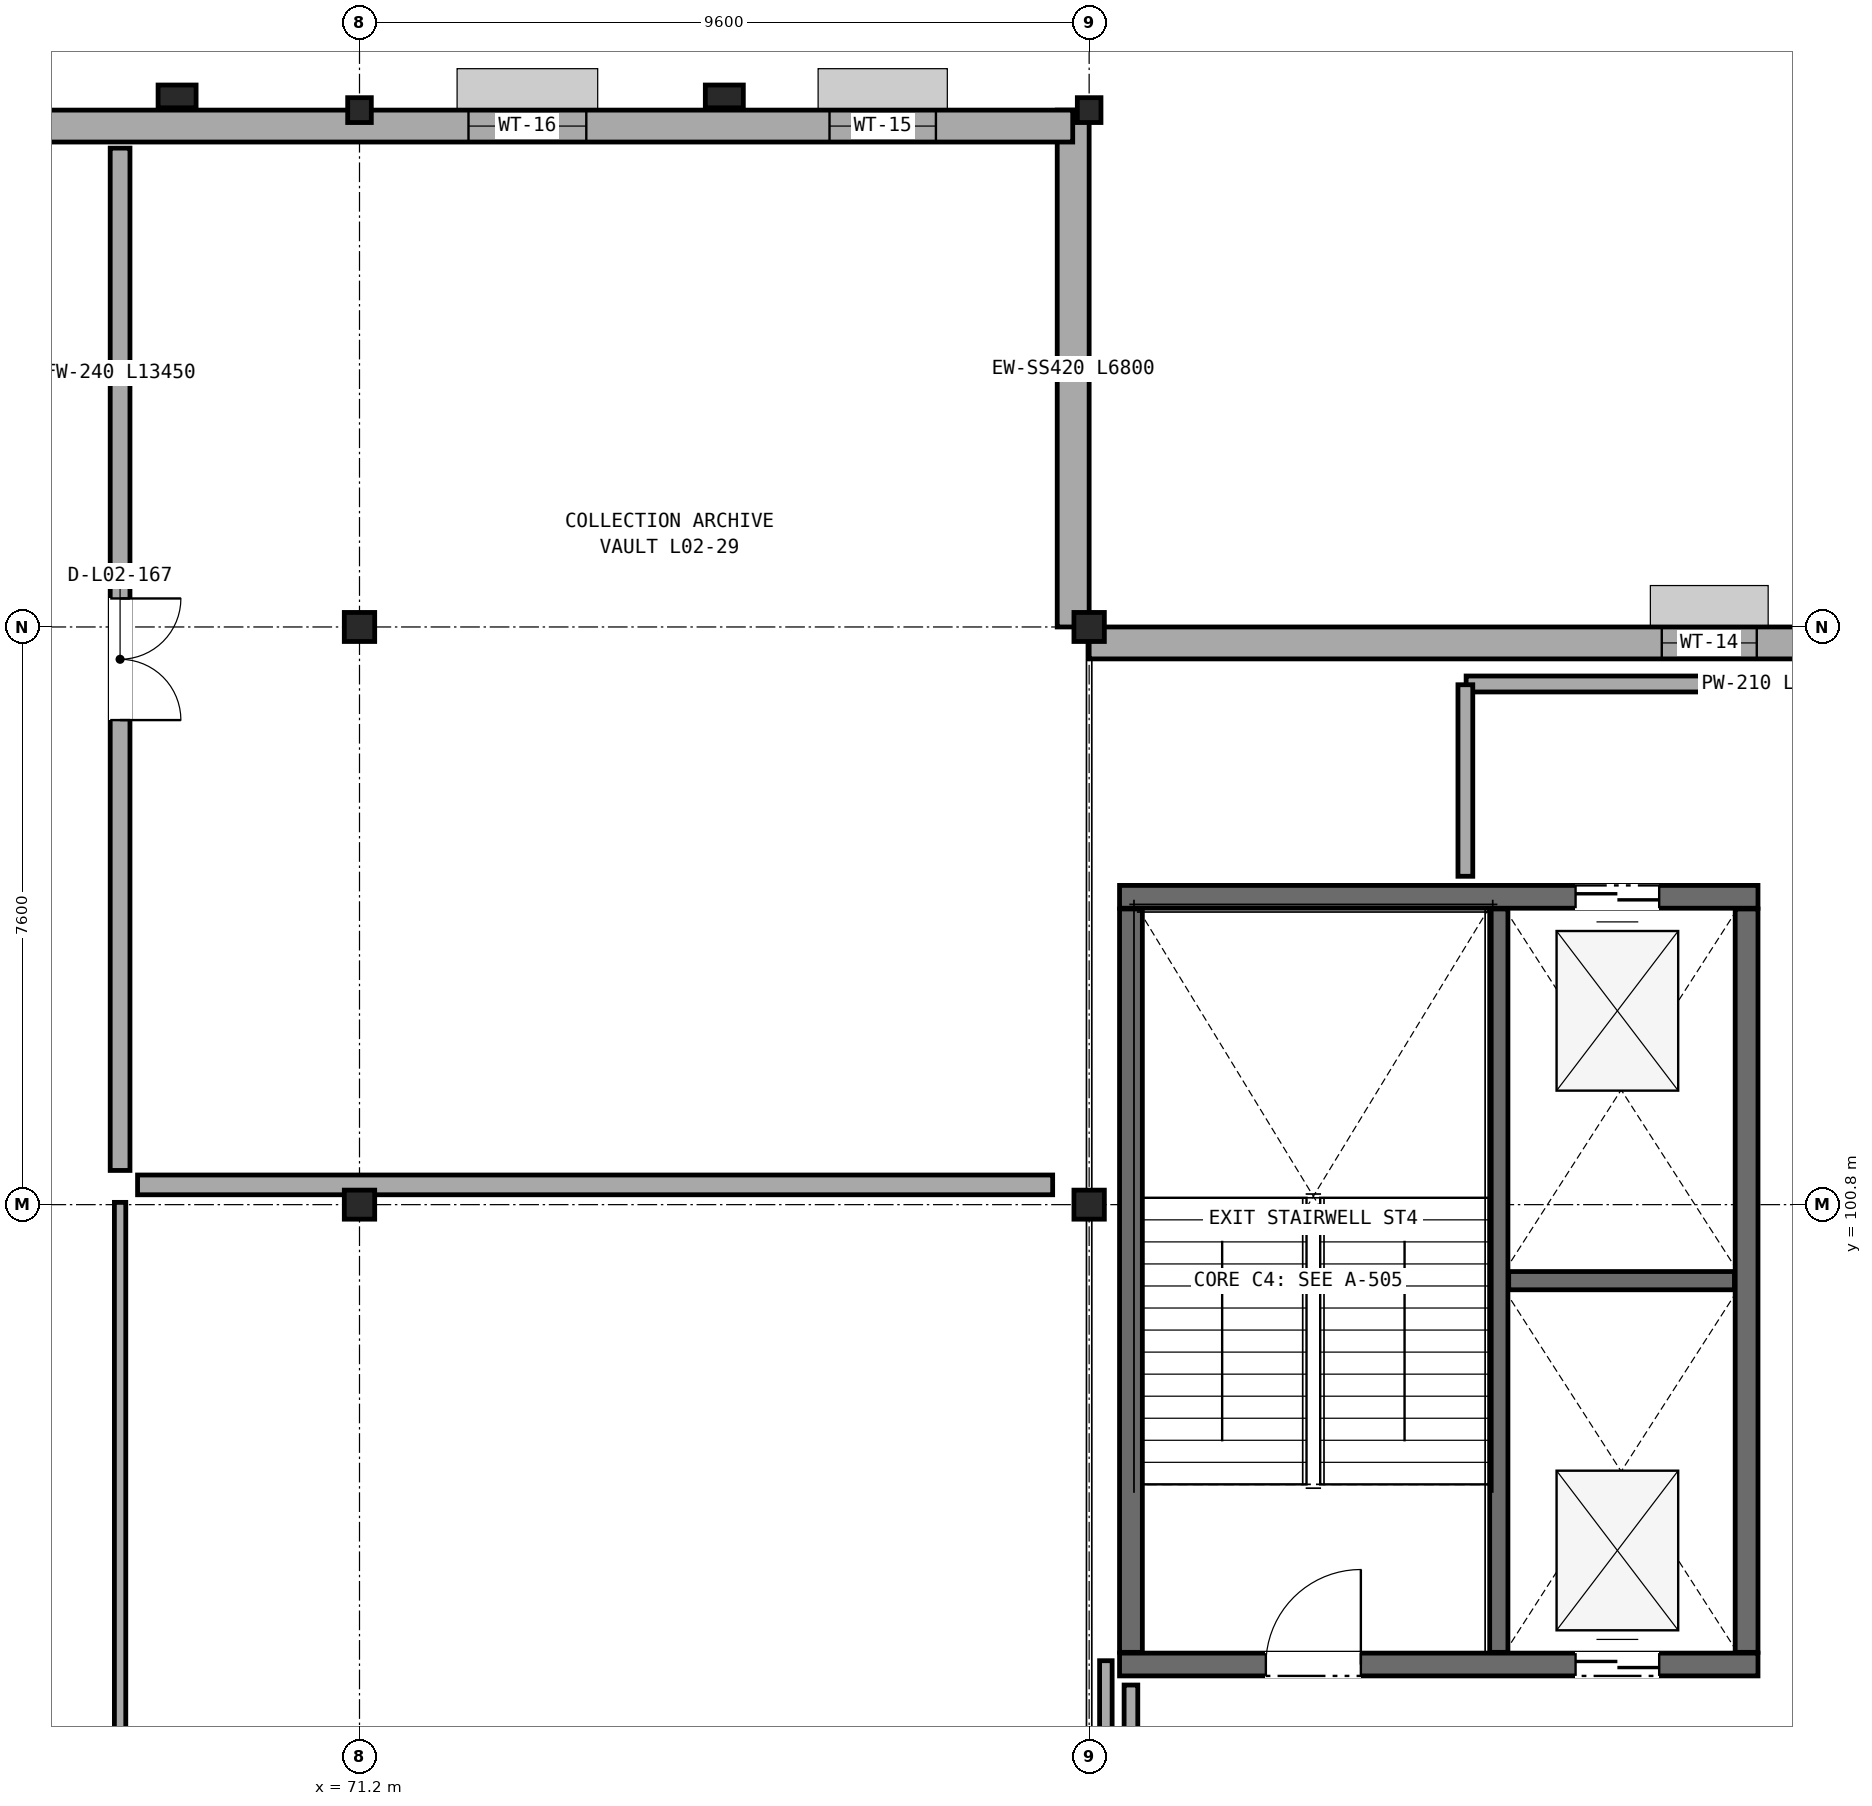
"""IFC4 building model, lengths in metres.
Left out: names, types, materials, properties, quantities, classifications, styles, units other than length and angle.
Written with IfcOpenShell. Run it as: python <this file> out.ifc"""

import sys

from ifc_helpers import new_model, si_unit, direction, frame, frame_2d, origin, origin_2d, place, context, subcontext, project, spatial, rectangle, i_section, extrude, element, fill, save


model = new_model("IFC4")
c1 = context("Model", 3, precision=1e-05, world=origin(), true_north=direction((0.0, 1.0)))
c2 = subcontext(c1, "Body", "Model", "MODEL_VIEW")
j1 = project(units=[si_unit("LENGTHUNIT", "METRE"), si_unit("PLANEANGLEUNIT", "RADIAN")], contexts=[c1])
p1 = place(None, origin())
s1 = spatial("IfcSite", under=j1, at=p1, CompositionType="ELEMENT")
p2 = place(p1, origin())
s2 = spatial("IfcBuilding", under=s1, at=p2, CompositionType="ELEMENT")
p3 = place(p2, frame((0.0, 0.0, 10.1)))
s3 = spatial("IfcBuildingStorey", under=s2, at=p3, CompositionType="ELEMENT", Elevation=10.1)
for number, where, z_axis, x_axis in (
    (1, (71.2, 100.8, 0.0), (0.0, 0.0, 1.0), (1.0, 0.0, 0.0)),
    (2, (71.2, 108.4, 0.0), (0.0, 0.0, 1.0), (1.0, 0.0, 0.0)),
):
    element("IfcColumn", number, at=place(p3, frame(where, z_axis=z_axis, x_axis=x_axis)), inside=s3, PredefinedType="COLUMN", context=c2, shape_type="SweptSolid", body=[
        extrude(i_section(OverallWidth=0.4, OverallDepth=0.382, WebThickness=0.025, FlangeThickness=0.036, at=origin_2d()), origin(), (0.0, 0.0, 1.0), 4.5),
    ])
p4 = place(p3, frame((71.2, 115.2, 0.0), z_axis=(0.0, 0.0, 1.0), x_axis=(1.0, 0.0, 0.0)))
e3 = element("IfcColumn", 3, at=p4, inside=s3, PredefinedType="COLUMN", context=c2, shape_type="SweptSolid", body=[
    extrude(i_section(OverallWidth=0.311, OverallDepth=0.327, WebThickness=0.016, FlangeThickness=0.025, FilletRadius=0.017, at=origin_2d()), origin(), (0.0, 0.0, 1.0), 4.5),
])
for number, where, z_axis, x_axis in (
    (4, (80.8, 100.8, 0.0), (0.0, 0.0, 1.0), (1.0, 0.0, 0.0)),
    (5, (80.8, 108.4, 0.0), (0.0, 0.0, 1.0), (1.0, 0.0, 0.0)),
):
    element("IfcColumn", number, at=place(p3, frame(where, z_axis=z_axis, x_axis=x_axis)), inside=s3, PredefinedType="COLUMN", context=c2, shape_type="SweptSolid", body=[
        extrude(i_section(OverallWidth=0.4, OverallDepth=0.382, WebThickness=0.025, FlangeThickness=0.036, at=origin_2d()), origin(), (0.0, 0.0, 1.0), 4.5),
    ])
p5 = place(p3, frame((80.8, 115.2, 0.0), z_axis=(0.0, 0.0, 1.0), x_axis=(1.0, 0.0, 0.0)))
e6 = element("IfcColumn", 6, at=p5, inside=s3, PredefinedType="COLUMN", context=c2, shape_type="SweptSolid", body=[
    extrude(i_section(OverallWidth=0.311, OverallDepth=0.327, WebThickness=0.016, FlangeThickness=0.025, FilletRadius=0.017, at=origin_2d()), origin(), (0.0, 0.0, 1.0), 4.5),
])
for number, where, z_axis, x_axis in (
    (7, (68.8, 115.38, 0.0), (0.0, 0.0, 1.0), (1.0, 0.0, 0.0)),
    (8, (76.0, 115.38, 0.0), (0.0, 0.0, 1.0), (1.0, 0.0, 0.0)),
):
    element("IfcColumn", number, at=place(p3, frame(where, z_axis=z_axis, x_axis=x_axis)), inside=s3, PredefinedType="PILASTER", context=c2, shape_type="SweptSolid", body=[
        extrude(rectangle(XDim=0.5, YDim=0.3, at=origin_2d()), origin(), (0.0, 0.0, 1.0), 4.5),
    ])
p6 = place(p3, frame((118.984, 108.19, 0.0), z_axis=(0.0, 0.0, 1.0), x_axis=(-1.0, 0.0, 0.0)))
e9 = element("IfcWall", 9, at=p6, inside=s3, PredefinedType="SOLIDWALL", context=c2, shape_type="SweptSolid", body=[
    extrude(rectangle(XDim=38.184, YDim=0.42, at=frame_2d((19.092, 0.0))), origin(), (0.0, 0.0, 1.0), 3.588),
])
p7 = place(p6, frame((1.8, 0.0, 0.9)))
e10 = element("IfcOpeningElement", 10, at=p7, cuts=e9, PredefinedType="OPENING", context=c2, shape_type="SweptSolid", body=[
    extrude(rectangle(XDim=2.2, YDim=1.55, at=frame_2d((1.1, 0.775))), frame((0.0, 0.22, 0.0), z_axis=(0.0, -1.0, 0.0), x_axis=(1.0, 0.0, 0.0)), (0.0, 0.0, 1.0), 0.44),
])
p8 = place(p6, frame((11.0, 0.0, 0.9)))
e11 = element("IfcOpeningElement", 11, at=p8, cuts=e9, PredefinedType="OPENING", context=c2, shape_type="SweptSolid", body=[
    extrude(rectangle(XDim=2.4, YDim=1.55, at=frame_2d((1.2, 0.775))), frame((0.0, 0.22, 0.0), z_axis=(0.0, -1.0, 0.0), x_axis=(1.0, 0.0, 0.0)), (0.0, 0.0, 1.0), 0.44),
])
p9 = place(p6, frame((15.6, 0.0, 0.9)))
e12 = element("IfcOpeningElement", 12, at=p9, cuts=e9, PredefinedType="OPENING", context=c2, shape_type="SweptSolid", body=[
    extrude(rectangle(XDim=2.65, YDim=1.55, at=frame_2d((1.325, 0.775))), frame((0.0, 0.22, 0.0), z_axis=(0.0, -1.0, 0.0), x_axis=(1.0, 0.0, 0.0)), (0.0, 0.0, 1.0), 0.44),
])
p10 = place(p6, frame((20.2, 0.0, 0.9)))
e13 = element("IfcOpeningElement", 13, at=p10, cuts=e9, PredefinedType="OPENING", context=c2, shape_type="SweptSolid", body=[
    extrude(rectangle(XDim=0.95, YDim=1.85, at=frame_2d((0.475, 0.925))), frame((0.0, 0.22, 0.0), z_axis=(0.0, -1.0, 0.0), x_axis=(1.0, 0.0, 0.0)), (0.0, 0.0, 1.0), 0.44),
])
p11 = place(p6, frame((24.8, 0.0, 0.9)))
e14 = element("IfcOpeningElement", 14, at=p11, cuts=e9, PredefinedType="OPENING", context=c2, shape_type="SweptSolid", body=[
    extrude(rectangle(XDim=1.1, YDim=1.85, at=frame_2d((0.55, 0.925))), frame((0.0, 0.22, 0.0), z_axis=(0.0, -1.0, 0.0), x_axis=(1.0, 0.0, 0.0)), (0.0, 0.0, 1.0), 0.44),
])
p12 = place(p6, frame((29.4, 0.0, 0.9)))
e15 = element("IfcOpeningElement", 15, at=p12, cuts=e9, PredefinedType="OPENING", context=c2, shape_type="SweptSolid", body=[
    extrude(rectangle(XDim=1.25, YDim=1.85, at=frame_2d((0.625, 0.925))), frame((0.0, 0.22, 0.0), z_axis=(0.0, -1.0, 0.0), x_axis=(1.0, 0.0, 0.0)), (0.0, 0.0, 1.0), 0.44),
])
p13 = place(p3, frame((80.59, 108.4, 0.0), z_axis=(0.0, 0.0, 1.0), x_axis=(0.0, 1.0, 0.0)))
e16 = element("IfcWall", 16, at=p13, inside=s3, PredefinedType="SOLIDWALL", context=c2, shape_type="SweptSolid", body=[
    extrude(rectangle(XDim=6.8, YDim=0.42, at=frame_2d((3.4, 0.0))), origin(), (0.0, 0.0, 1.0), 3.588),
])
p14 = place(p3, frame((80.584, 114.99, 0.0), z_axis=(0.0, 0.0, 1.0), x_axis=(-1.0, 0.0, 0.0)))
e17 = element("IfcWall", 17, at=p14, inside=s3, PredefinedType="SOLIDWALL", context=c2, shape_type="SweptSolid", body=[
    extrude(rectangle(XDim=38.184, YDim=0.42, at=frame_2d((19.092, 0.0))), origin(), (0.0, 0.0, 1.0), 3.738),
])
p15 = place(p14, frame((1.8, 0.0, 0.9)))
e18 = element("IfcOpeningElement", 18, at=p15, cuts=e17, PredefinedType="OPENING", context=c2, shape_type="SweptSolid", body=[
    extrude(rectangle(XDim=1.4, YDim=1.85, at=frame_2d((0.7, 0.925))), frame((0.0, 0.22, 0.0), z_axis=(0.0, -1.0, 0.0), x_axis=(1.0, 0.0, 0.0)), (0.0, 0.0, 1.0), 0.44),
])
p16 = place(p14, frame((6.4, 0.0, 0.9)))
e19 = element("IfcOpeningElement", 19, at=p16, cuts=e17, PredefinedType="OPENING", context=c2, shape_type="SweptSolid", body=[
    extrude(rectangle(XDim=1.55, YDim=1.85, at=frame_2d((0.775, 0.925))), frame((0.0, 0.22, 0.0), z_axis=(0.0, -1.0, 0.0), x_axis=(1.0, 0.0, 0.0)), (0.0, 0.0, 1.0), 0.44),
])
p17 = place(p14, frame((15.6, 0.0, 0.9)))
e20 = element("IfcOpeningElement", 20, at=p17, cuts=e17, PredefinedType="OPENING", context=c2, shape_type="SweptSolid", body=[
    extrude(rectangle(XDim=1.82, YDim=1.85, at=frame_2d((0.91, 0.925))), frame((0.0, 0.22, 0.0), z_axis=(0.0, -1.0, 0.0), x_axis=(1.0, 0.0, 0.0)), (0.0, 0.0, 1.0), 0.44),
])
p18 = place(p14, frame((20.2, 0.0, 0.9)))
e21 = element("IfcOpeningElement", 21, at=p18, cuts=e17, PredefinedType="OPENING", context=c2, shape_type="SweptSolid", body=[
    extrude(rectangle(XDim=1.85, YDim=1.85, at=frame_2d((0.925, 0.925))), frame((0.0, 0.22, 0.0), z_axis=(0.0, -1.0, 0.0), x_axis=(1.0, 0.0, 0.0)), (0.0, 0.0, 1.0), 0.44),
])
p19 = place(p14, frame((24.8, 0.0, 0.9)))
e22 = element("IfcOpeningElement", 22, at=p19, cuts=e17, PredefinedType="OPENING", context=c2, shape_type="SweptSolid", body=[
    extrude(rectangle(XDim=2.12, YDim=1.85, at=frame_2d((1.06, 0.925))), frame((0.0, 0.22, 0.0), z_axis=(0.0, -1.0, 0.0), x_axis=(1.0, 0.0, 0.0)), (0.0, 0.0, 1.0), 0.44),
])
p20 = place(p14, frame((29.4, 0.0, 0.9)))
e23 = element("IfcOpeningElement", 23, at=p20, cuts=e17, PredefinedType="OPENING", context=c2, shape_type="SweptSolid", body=[
    extrude(rectangle(XDim=2.2, YDim=1.85, at=frame_2d((1.1, 0.925))), frame((0.0, 0.22, 0.0), z_axis=(0.0, -1.0, 0.0), x_axis=(1.0, 0.0, 0.0)), (0.0, 0.0, 1.0), 0.44),
])
p21 = place(p3, frame((81.2, 94.75, 0.0), z_axis=(0.0, 0.0, 1.0), x_axis=(1.0, 0.0, 0.0)))
e24 = element("IfcWall", 24, at=p21, inside=s3, PredefinedType="SHEAR", context=c2, shape_type="SweptSolid", body=[
    extrude(rectangle(XDim=8.4, YDim=0.3, at=frame_2d((4.2, 0.0))), origin(), (0.0, 0.0, 1.0), 4.245),
])
p22 = place(p21, frame((1.925, 0.0, 0.0)))
e25 = element("IfcOpeningElement", 25, at=p22, cuts=e24, PredefinedType="OPENING", context=c2, shape_type="SweptSolid", body=[
    extrude(rectangle(XDim=1.25, YDim=2.2, at=frame_2d((0.625, 1.1))), frame((0.0, 0.16, 0.0), z_axis=(0.0, -1.0, 0.0), x_axis=(1.0, 0.0, 0.0)), (0.0, 0.0, 1.0), 0.32),
])
p23 = place(p21, frame((6.0, 0.0, 0.0)))
e26 = element("IfcOpeningElement", 26, at=p23, cuts=e24, PredefinedType="OPENING", context=c2, shape_type="SweptSolid", body=[
    extrude(rectangle(XDim=1.1, YDim=2.2, at=frame_2d((0.55, 1.1))), frame((0.0, 0.16, 0.0), z_axis=(0.0, -1.0, 0.0), x_axis=(1.0, 0.0, 0.0)), (0.0, 0.0, 1.0), 0.32),
])
p24 = place(p3, frame((89.6, 104.85, 0.0), z_axis=(0.0, 0.0, 1.0), x_axis=(-1.0, 0.0, 0.0)))
e27 = element("IfcWall", 27, at=p24, inside=s3, PredefinedType="SHEAR", context=c2, shape_type="SweptSolid", body=[
    extrude(rectangle(XDim=8.4, YDim=0.3, at=frame_2d((4.2, 0.0))), origin(), (0.0, 0.0, 1.0), 4.245),
])
p25 = place(p24, frame((1.3, 0.0, 0.0)))
e28 = element("IfcOpeningElement", 28, at=p25, cuts=e27, PredefinedType="OPENING", context=c2, shape_type="SweptSolid", body=[
    extrude(rectangle(XDim=1.1, YDim=2.2, at=frame_2d((0.55, 1.1))), frame((0.0, 0.16, 0.0), z_axis=(0.0, -1.0, 0.0), x_axis=(1.0, 0.0, 0.0)), (0.0, 0.0, 1.0), 0.32),
])
for number, where, z_axis, x_axis in (
    (29, (89.45, 94.91, 0.0), (0.0, 0.0, 1.0), (0.0, 1.0, 0.0)),
    (30, (81.35, 104.69, 0.0), (0.0, 0.0, 1.0), (0.0, -1.0, 0.0)),
):
    element("IfcWall", number, at=place(p3, frame(where, z_axis=z_axis, x_axis=x_axis)), inside=s3, PredefinedType="SHEAR", context=c2, shape_type="SweptSolid", body=[
        extrude(rectangle(XDim=9.78, YDim=0.3, at=frame_2d((4.89, 0.0))), origin(), (0.0, 0.0, 1.0), 4.245),
    ])
p26 = place(p3, frame((86.19, 94.91, 0.0), z_axis=(0.0, 0.0, 1.0), x_axis=(0.0, 1.0, 0.0)))
e31 = element("IfcWall", 31, at=p26, inside=s3, PredefinedType="SOLIDWALL", context=c2, shape_type="SweptSolid", body=[
    extrude(rectangle(XDim=9.78, YDim=0.24, at=frame_2d((4.89, 0.0))), origin(), (0.0, 0.0, 1.0), 4.245),
])
p27 = place(p3, frame((86.32, 99.8, 0.0), z_axis=(0.0, 0.0, 1.0), x_axis=(1.0, 0.0, 0.0)))
e32 = element("IfcWall", 32, at=p27, inside=s3, PredefinedType="SOLIDWALL", context=c2, shape_type="SweptSolid", body=[
    extrude(rectangle(XDim=2.97, YDim=0.24, at=frame_2d((1.485, 0.0))), origin(), (0.0, 0.0, 1.0), 4.245),
])
p28 = place(p3, frame((93.79, 107.65, 0.0), z_axis=(0.0, 0.0, 1.0), x_axis=(-1.0, 0.0, 0.0)))
e33 = element("IfcWall", 33, at=p28, inside=s3, PredefinedType="PARTITIONING", context=c2, shape_type="SweptSolid", body=[
    extrude(rectangle(XDim=8.03, YDim=0.21, at=frame_2d((4.015, 0.0))), origin(), (0.0, 0.0, 1.0), 3.763),
])
p29 = place(p3, frame((85.75, 107.64, 0.0), z_axis=(0.0, 0.0, 1.0), x_axis=(0.0, -1.0, 0.0)))
e34 = element("IfcWall", 34, at=p29, inside=s3, PredefinedType="PARTITIONING", context=c2, shape_type="SweptSolid", body=[
    extrude(rectangle(XDim=2.52, YDim=0.195, at=frame_2d((1.26, 0.0))), origin(), (0.0, 0.0, 1.0), 4.13),
])
p30 = place(p3, frame((81.35, 94.48, 0.0), z_axis=(0.0, 0.0, 1.0), x_axis=(0.0, -1.0, 0.0)))
e35 = element("IfcWall", 35, at=p30, inside=s3, PredefinedType="PARTITIONING", context=c2, shape_type="SweptSolid", body=[
    extrude(rectangle(XDim=1.97, YDim=0.18, at=frame_2d((0.985, 0.0))), origin(), (0.0, 0.0, 1.0), 4.13),
])
p31 = place(p3, frame((81.02, 92.48, 0.0), z_axis=(0.0, 0.0, 1.0), x_axis=(0.0, 1.0, 0.0)))
e36 = element("IfcWall", 36, at=p31, inside=s3, PredefinedType="PARTITIONING", context=c2, shape_type="SweptSolid", body=[
    extrude(rectangle(XDim=2.32, YDim=0.165, at=frame_2d((1.16, 0.0))), origin(), (0.0, 0.0, 1.0), 3.723),
])
p32 = place(p3, frame((68.05, 79.88, 0.0), z_axis=(0.0, 0.0, 1.0), x_axis=(0.0, 1.0, 0.0)))
e37 = element("IfcWall", 37, at=p32, inside=s3, PredefinedType="PARTITIONING", context=c2, shape_type="SweptSolid", body=[
    extrude(rectangle(XDim=20.95, YDim=0.15, at=frame_2d((10.475, 0.0))), origin(), (0.0, 0.0, 1.0), 3.573),
])
p33 = place(p3, frame((68.05, 101.25, 0.0), z_axis=(0.0, 0.0, 1.0), x_axis=(0.0, 1.0, 0.0)))
e38 = element("IfcWall", 38, at=p33, inside=s3, PredefinedType="SOLIDWALL", context=c2, shape_type="SweptSolid", body=[
    extrude(rectangle(XDim=13.45, YDim=0.26, at=frame_2d((6.725, 0.0))), origin(), (0.0, 0.0, 1.0), 3.573),
])
p34 = place(p33, frame((5.925, 0.0, 0.0)))
e39 = element("IfcOpeningElement", 39, at=p34, cuts=e38, PredefinedType="OPENING", context=c2, shape_type="SweptSolid", body=[
    extrude(rectangle(XDim=1.6, YDim=2.4, at=frame_2d((0.8, 1.2))), frame((0.0, 0.14, 0.0), z_axis=(0.0, -1.0, 0.0), x_axis=(1.0, 0.0, 0.0)), (0.0, 0.0, 1.0), 0.28),
])
p35 = place(p3, frame((68.28, 101.06, 0.0), z_axis=(0.0, 0.0, 1.0), x_axis=(1.0, 0.0, 0.0)))
e40 = element("IfcWall", 40, at=p35, inside=s3, PredefinedType="SOLIDWALL", context=c2, shape_type="SweptSolid", body=[
    extrude(rectangle(XDim=12.04, YDim=0.26, at=frame_2d((6.02, 0.0))), origin(), (0.0, 0.0, 1.0), 3.573),
])
p36 = place(p12, origin())
e41 = element("IfcWindow", 41, at=p36, inside=s3, PartitioningType="SINGLE_PANEL", PredefinedType="WINDOW", context=c2, shape_type="SweptSolid", body=[
    extrude(rectangle(XDim=1.25, YDim=1.85, at=frame_2d((0.625, 0.925))), frame((0.0, 0.03, 0.0), z_axis=(0.0, -1.0, 0.0), x_axis=(1.0, 0.0, 0.0)), (0.0, 0.0, 1.0), 0.06),
])
fill(e15, e41)
p37 = place(p15, origin())
e42 = element("IfcWindow", 42, at=p37, inside=s3, PartitioningType="SINGLE_PANEL", PredefinedType="WINDOW", context=c2, shape_type="SweptSolid", body=[
    extrude(rectangle(XDim=1.4, YDim=1.85, at=frame_2d((0.7, 0.925))), frame((0.0, 0.03, 0.0), z_axis=(0.0, -1.0, 0.0), x_axis=(1.0, 0.0, 0.0)), (0.0, 0.0, 1.0), 0.06),
])
fill(e18, e42)
p38 = place(p16, origin())
e43 = element("IfcWindow", 43, at=p38, inside=s3, PartitioningType="SINGLE_PANEL", PredefinedType="WINDOW", context=c2, shape_type="SweptSolid", body=[
    extrude(rectangle(XDim=1.55, YDim=1.85, at=frame_2d((0.775, 0.925))), frame((0.0, 0.03, 0.0), z_axis=(0.0, -1.0, 0.0), x_axis=(1.0, 0.0, 0.0)), (0.0, 0.0, 1.0), 0.06),
])
fill(e19, e43)
p39 = place(p22, origin())
e44 = element("IfcDoor", 44, at=p39, inside=s3, OperationType="SINGLE_SWING_RIGHT", PredefinedType="DOOR", context=c2, shape_type="SweptSolid", body=[
    extrude(rectangle(XDim=1.25, YDim=2.2, at=frame_2d((0.625, 1.1))), frame((0.0, 0.025, 0.0), z_axis=(0.0, -1.0, 0.0), x_axis=(1.0, 0.0, 0.0)), (0.0, 0.0, 1.0), 0.05),
])
fill(e25, e44)
p40 = place(p23, origin())
e45 = element("IfcDoor", 45, at=p40, inside=s3, OperationType="DOUBLE_DOOR_SLIDING", PredefinedType="DOOR", context=c2, shape_type="SweptSolid", body=[
    extrude(rectangle(XDim=1.1, YDim=2.2, at=frame_2d((0.55, 1.1))), frame((0.0, 0.025, 0.0), z_axis=(0.0, -1.0, 0.0), x_axis=(1.0, 0.0, 0.0)), (0.0, 0.0, 1.0), 0.05),
])
fill(e26, e45)
p41 = place(p25, origin())
e46 = element("IfcDoor", 46, at=p41, inside=s3, OperationType="DOUBLE_DOOR_SLIDING", PredefinedType="DOOR", context=c2, shape_type="SweptSolid", body=[
    extrude(rectangle(XDim=1.1, YDim=2.2, at=frame_2d((0.55, 1.1))), frame((0.0, 0.025, 0.0), z_axis=(0.0, -1.0, 0.0), x_axis=(1.0, 0.0, 0.0)), (0.0, 0.0, 1.0), 0.05),
])
fill(e28, e46)
p42 = place(p34, frame((1.6, 0.0, 0.0), z_axis=(0.0, 0.0, 1.0), x_axis=(-1.0, 0.0, 0.0)))
e47 = element("IfcDoor", 47, at=p42, inside=s3, OperationType="DOUBLE_DOOR_SINGLE_SWING", PredefinedType="DOOR", context=c2, shape_type="SweptSolid", body=[
    extrude(rectangle(XDim=1.6, YDim=2.4, at=frame_2d((0.8, 1.2))), frame((0.0, 0.025, 0.0), z_axis=(0.0, -1.0, 0.0), x_axis=(1.0, 0.0, 0.0)), (0.0, 0.0, 1.0), 0.05),
])
fill(e39, e47)
save(model, sys.argv[1])
